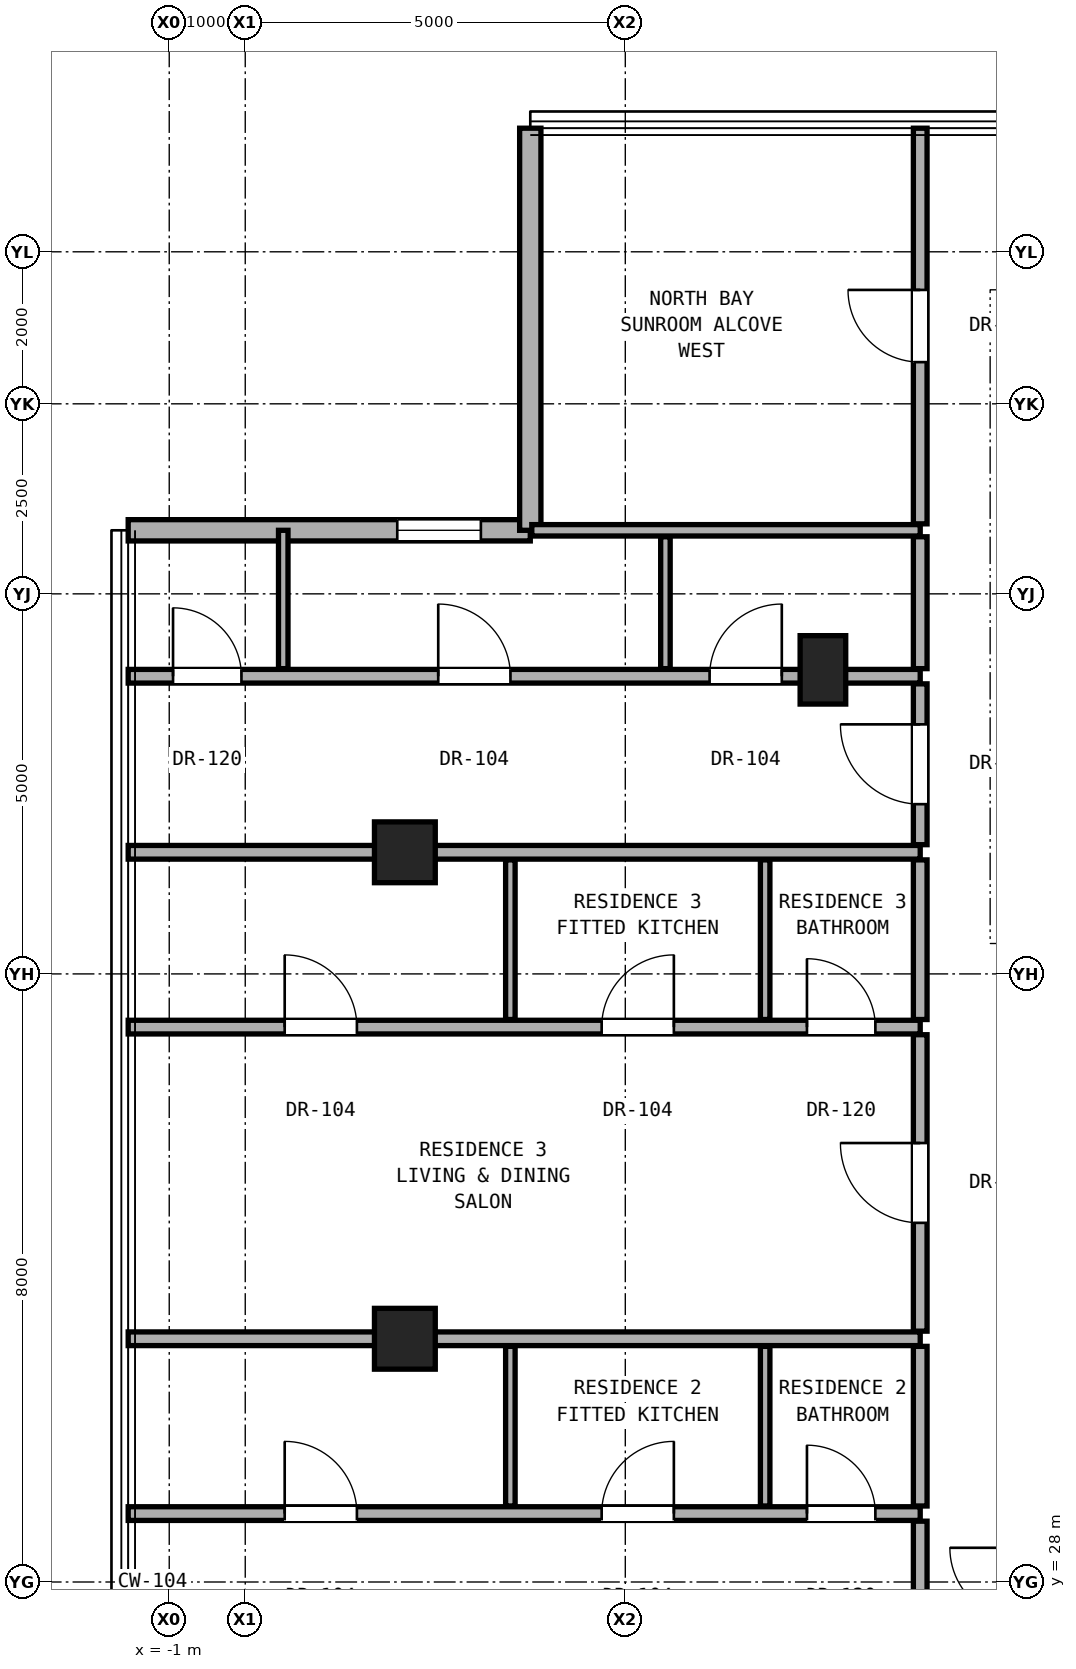
"""IFC4 building model, lengths in metres.
Left out: names, types, materials, properties, quantities, classifications, styles, units other than length and angle.
Written with IfcOpenShell. Run it as: python <this file> out.ifc"""

import sys

from ifc_helpers import new_model, si_unit, direction, frame, frame_2d, origin, origin_2d, place, context, subcontext, project, spatial, rectangle, hollow_rectangle, extrude, element, fill, save


model = new_model("IFC4")
c1 = context("Model", 3, precision=1e-05, world=origin(), true_north=direction((0.0, 1.0)))
c2 = subcontext(c1, "Body", "Model", "MODEL_VIEW")
j1 = project(units=[si_unit("LENGTHUNIT", "METRE"), si_unit("PLANEANGLEUNIT", "RADIAN")], contexts=[c1])
p1 = place(None, origin())
s1 = spatial("IfcSite", under=j1, at=p1, CompositionType="ELEMENT")
p2 = place(p1, origin())
s2 = spatial("IfcBuilding", under=s1, at=p2, CompositionType="ELEMENT")
p3 = place(p2, frame((0.0, 0.0, 242.5)))
s3 = spatial("IfcBuildingStorey", under=s2, at=p3, CompositionType="ELEMENT", Elevation=242.5)
for number, where, z_axis, x_axis in (
    (1, (2.1, 31.2, 0.0), (0.0, 0.0, 1.0), (1.0, 0.0, 0.0)),
    (2, (2.1, 37.6, 0.0), (0.0, 0.0, 1.0), (1.0, 0.0, 0.0)),
):
    element("IfcColumn", number, at=place(p3, frame(where, z_axis=z_axis, x_axis=x_axis)), inside=s3, PredefinedType="COLUMN", context=c2, shape_type="SweptSolid", body=[
        extrude(hollow_rectangle(XDim=0.8, YDim=0.8, WallThickness=0.045, at=origin_2d()), origin(), (0.0, 0.0, 1.0), 3.3),
    ])
p4 = place(p3, frame((7.6, 40.0, 0.0), z_axis=(0.0, 0.0, 1.0), x_axis=(1.0, 0.0, 0.0)))
e3 = element("IfcColumn", 3, at=p4, inside=s3, PredefinedType="PILASTER", context=c2, shape_type="SweptSolid", body=[
    extrude(rectangle(XDim=0.6, YDim=0.9, at=origin_2d()), origin(), (0.0, 0.0, 1.0), 3.3),
])
p5 = place(p3, frame((3.75, 41.836, 0.0), z_axis=(0.0, 0.0, 1.0), x_axis=(-1.0, 0.0, 0.0)))
e4 = element("IfcWall", 4, at=p5, inside=s3, PredefinedType="SOLIDWALL", context=c2, shape_type="SweptSolid", body=[
    extrude(rectangle(XDim=5.29, YDim=0.28, at=frame_2d((2.645, 0.0))), origin(), (0.0, 0.0, 1.0), 3.08),
])
p6 = place(p5, frame((0.65, 0.0, 0.85)))
e5 = element("IfcOpeningElement", 5, at=p6, cuts=e4, PredefinedType="OPENING", context=c2, shape_type="SweptSolid", body=[
    extrude(rectangle(XDim=1.1, YDim=2.0, at=frame_2d((0.55, 1.0))), frame((0.0, 0.15, 0.0), z_axis=(0.0, -1.0, 0.0), x_axis=(1.0, 0.0, 0.0)), (0.0, 0.0, 1.0), 0.3),
])
p7 = place(p3, frame((3.75, 47.126, 0.0), z_axis=(0.0, 0.0, 1.0), x_axis=(0.0, -1.0, 0.0)))
e6 = element("IfcWall", 6, at=p7, inside=s3, PredefinedType="SOLIDWALL", context=c2, shape_type="SweptSolid", body=[
    extrude(rectangle(XDim=5.29, YDim=0.28, at=frame_2d((2.645, 0.0))), origin(), (0.0, 0.0, 1.0), 3.08),
])
p8 = place(p3, frame((-1.54, 28.9, 0.0), z_axis=(0.0, 0.0, 1.0), x_axis=(1.0, 0.0, 0.0)))
e7 = element("IfcWall", 7, at=p8, inside=s3, PredefinedType="PARTITIONING", context=c2, shape_type="SweptSolid", body=[
    extrude(rectangle(XDim=10.42, YDim=0.18, at=frame_2d((5.21, 0.0))), origin(), (0.0, 0.0, 1.0), 2.319),
])
p9 = place(p8, frame((2.059, 0.0, 0.0)))
e8 = element("IfcOpeningElement", 8, at=p9, cuts=e7, PredefinedType="OPENING", context=c2, shape_type="SweptSolid", body=[
    extrude(rectangle(XDim=0.95, YDim=2.15, at=frame_2d((0.475, 1.075))), frame((0.0, 0.1, 0.0), z_axis=(0.0, -1.0, 0.0), x_axis=(1.0, 0.0, 0.0)), (0.0, 0.0, 1.0), 0.2),
])
p10 = place(p8, frame((6.229, 0.0, 0.0)))
e9 = element("IfcOpeningElement", 9, at=p10, cuts=e7, PredefinedType="OPENING", context=c2, shape_type="SweptSolid", body=[
    extrude(rectangle(XDim=0.95, YDim=2.15, at=frame_2d((0.475, 1.075))), frame((0.0, 0.1, 0.0), z_axis=(0.0, -1.0, 0.0), x_axis=(1.0, 0.0, 0.0)), (0.0, 0.0, 1.0), 0.2),
])
p11 = place(p8, frame((8.93, 0.0, 0.0)))
e10 = element("IfcOpeningElement", 10, at=p11, cuts=e7, PredefinedType="OPENING", context=c2, shape_type="SweptSolid", body=[
    extrude(rectangle(XDim=0.9, YDim=2.1, at=frame_2d((0.45, 1.05))), frame((0.0, 0.1, 0.0), z_axis=(0.0, -1.0, 0.0), x_axis=(1.0, 0.0, 0.0)), (0.0, 0.0, 1.0), 0.2),
])
p12 = place(p3, frame((-1.54, 31.2, 0.0), z_axis=(0.0, 0.0, 1.0), x_axis=(1.0, 0.0, 0.0)))
e11 = element("IfcWall", 11, at=p12, inside=s3, PredefinedType="PARTITIONING", context=c2, shape_type="SweptSolid", body=[
    extrude(rectangle(XDim=10.42, YDim=0.18, at=frame_2d((5.21, 0.0))), origin(), (0.0, 0.0, 1.0), 2.319),
])
p13 = place(p3, frame((-1.54, 35.3, 0.0), z_axis=(0.0, 0.0, 1.0), x_axis=(1.0, 0.0, 0.0)))
e12 = element("IfcWall", 12, at=p13, inside=s3, PredefinedType="PARTITIONING", context=c2, shape_type="SweptSolid", body=[
    extrude(rectangle(XDim=10.42, YDim=0.18, at=frame_2d((5.21, 0.0))), origin(), (0.0, 0.0, 1.0), 2.319),
])
p14 = place(p13, frame((2.059, 0.0, 0.0)))
e13 = element("IfcOpeningElement", 13, at=p14, cuts=e12, PredefinedType="OPENING", context=c2, shape_type="SweptSolid", body=[
    extrude(rectangle(XDim=0.95, YDim=2.15, at=frame_2d((0.475, 1.075))), frame((0.0, 0.1, 0.0), z_axis=(0.0, -1.0, 0.0), x_axis=(1.0, 0.0, 0.0)), (0.0, 0.0, 1.0), 0.2),
])
p15 = place(p13, frame((6.229, 0.0, 0.0)))
e14 = element("IfcOpeningElement", 14, at=p15, cuts=e12, PredefinedType="OPENING", context=c2, shape_type="SweptSolid", body=[
    extrude(rectangle(XDim=0.95, YDim=2.15, at=frame_2d((0.475, 1.075))), frame((0.0, 0.1, 0.0), z_axis=(0.0, -1.0, 0.0), x_axis=(1.0, 0.0, 0.0)), (0.0, 0.0, 1.0), 0.2),
])
p16 = place(p13, frame((8.93, 0.0, 0.0)))
e15 = element("IfcOpeningElement", 15, at=p16, cuts=e12, PredefinedType="OPENING", context=c2, shape_type="SweptSolid", body=[
    extrude(rectangle(XDim=0.9, YDim=2.1, at=frame_2d((0.45, 1.05))), frame((0.0, 0.1, 0.0), z_axis=(0.0, -1.0, 0.0), x_axis=(1.0, 0.0, 0.0)), (0.0, 0.0, 1.0), 0.2),
])
p17 = place(p3, frame((-1.54, 37.6, 0.0), z_axis=(0.0, 0.0, 1.0), x_axis=(1.0, 0.0, 0.0)))
e16 = element("IfcWall", 16, at=p17, inside=s3, PredefinedType="PARTITIONING", context=c2, shape_type="SweptSolid", body=[
    extrude(rectangle(XDim=10.42, YDim=0.18, at=frame_2d((5.21, 0.0))), origin(), (0.0, 0.0, 1.0), 2.319),
])
p18 = place(p3, frame((-1.54, 39.916, 0.0), z_axis=(0.0, 0.0, 1.0), x_axis=(1.0, 0.0, 0.0)))
e17 = element("IfcWall", 17, at=p18, inside=s3, PredefinedType="PARTITIONING", context=c2, shape_type="SweptSolid", body=[
    extrude(rectangle(XDim=10.42, YDim=0.18, at=frame_2d((5.21, 0.0))), origin(), (0.0, 0.0, 1.0), 2.543),
])
p19 = place(p18, frame((4.079, 0.0, 0.0)))
e18 = element("IfcOpeningElement", 18, at=p19, cuts=e17, PredefinedType="OPENING", context=c2, shape_type="SweptSolid", body=[
    extrude(rectangle(XDim=0.95, YDim=2.15, at=frame_2d((0.475, 1.075))), frame((0.0, 0.1, 0.0), z_axis=(0.0, -1.0, 0.0), x_axis=(1.0, 0.0, 0.0)), (0.0, 0.0, 1.0), 0.2),
])
p20 = place(p18, frame((7.649, 0.0, 0.0)))
e19 = element("IfcOpeningElement", 19, at=p20, cuts=e17, PredefinedType="OPENING", context=c2, shape_type="SweptSolid", body=[
    extrude(rectangle(XDim=0.95, YDim=2.15, at=frame_2d((0.475, 1.075))), frame((0.0, 0.1, 0.0), z_axis=(0.0, -1.0, 0.0), x_axis=(1.0, 0.0, 0.0)), (0.0, 0.0, 1.0), 0.2),
])
p21 = place(p18, frame((0.59, 0.0, 0.0)))
e20 = element("IfcOpeningElement", 20, at=p21, cuts=e17, PredefinedType="OPENING", context=c2, shape_type="SweptSolid", body=[
    extrude(rectangle(XDim=0.9, YDim=2.1, at=frame_2d((0.45, 1.05))), frame((0.0, 0.1, 0.0), z_axis=(0.0, -1.0, 0.0), x_axis=(1.0, 0.0, 0.0)), (0.0, 0.0, 1.0), 0.2),
])
p22 = place(p3, frame((3.77, 41.836, 0.0), z_axis=(0.0, 0.0, 1.0), x_axis=(1.0, 0.0, 0.0)))
e21 = element("IfcWall", 21, at=p22, inside=s3, PredefinedType="PARTITIONING", context=c2, shape_type="SweptSolid", body=[
    extrude(rectangle(XDim=5.11, YDim=0.15, at=frame_2d((2.555, 0.0))), origin(), (0.0, 0.0, 1.0), 3.1),
])
p23 = place(p3, frame((0.5, 40.016, 0.0), z_axis=(0.0, 0.0, 1.0), x_axis=(0.0, 1.0, 0.0)))
e22 = element("IfcWall", 22, at=p23, inside=s3, PredefinedType="PARTITIONING", context=c2, shape_type="SweptSolid", body=[
    extrude(rectangle(XDim=1.82, YDim=0.125, at=frame_2d((0.91, 0.0))), origin(), (0.0, 0.0, 1.0), 3.1),
])
p24 = place(p3, frame((3.488, 29.0, 0.0), z_axis=(0.0, 0.0, 1.0), x_axis=(0.0, 1.0, 0.0)))
e23 = element("IfcWall", 23, at=p24, inside=s3, PredefinedType="PARTITIONING", context=c2, shape_type="SweptSolid", body=[
    extrude(rectangle(XDim=2.1, YDim=0.125, at=frame_2d((1.05, 0.0))), origin(), (0.0, 0.0, 1.0), 2.396),
])
p25 = place(p3, frame((3.488, 35.4, 0.0), z_axis=(0.0, 0.0, 1.0), x_axis=(0.0, 1.0, 0.0)))
e24 = element("IfcWall", 24, at=p25, inside=s3, PredefinedType="PARTITIONING", context=c2, shape_type="SweptSolid", body=[
    extrude(rectangle(XDim=2.1, YDim=0.125, at=frame_2d((1.05, 0.0))), origin(), (0.0, 0.0, 1.0), 2.492),
])
p26 = place(p3, frame((5.528, 40.016, 0.0), z_axis=(0.0, 0.0, 1.0), x_axis=(0.0, 1.0, 0.0)))
e25 = element("IfcWall", 25, at=p26, inside=s3, PredefinedType="PARTITIONING", context=c2, shape_type="SweptSolid", body=[
    extrude(rectangle(XDim=1.735, YDim=0.125, at=frame_2d((0.867, 0.0))), origin(), (0.0, 0.0, 1.0), 3.1),
])
p27 = place(p3, frame((6.84, 29.0, 0.0), z_axis=(0.0, 0.0, 1.0), x_axis=(0.0, 1.0, 0.0)))
e26 = element("IfcWall", 26, at=p27, inside=s3, PredefinedType="PARTITIONING", context=c2, shape_type="SweptSolid", body=[
    extrude(rectangle(XDim=2.1, YDim=0.125, at=frame_2d((1.05, 0.0))), origin(), (0.0, 0.0, 1.0), 2.396),
])
p28 = place(p3, frame((6.84, 35.4, 0.0), z_axis=(0.0, 0.0, 1.0), x_axis=(0.0, 1.0, 0.0)))
e27 = element("IfcWall", 27, at=p28, inside=s3, PredefinedType="PARTITIONING", context=c2, shape_type="SweptSolid", body=[
    extrude(rectangle(XDim=2.1, YDim=0.125, at=frame_2d((1.05, 0.0))), origin(), (0.0, 0.0, 1.0), 2.492),
])
p29 = place(p3, frame((8.88, 18.5, 0.0), z_axis=(0.0, 0.0, 1.0), x_axis=(0.0, 1.0, 0.0)))
e28 = element("IfcWall", 28, at=p29, inside=s3, PredefinedType="PARTITIONING", context=c2, shape_type="SweptSolid", body=[
    extrude(rectangle(XDim=10.3, YDim=0.18, at=frame_2d((5.15, 0.0))), origin(), (0.0, 0.0, 1.0), 2.396),
])
p30 = place(p29, frame((4.625, 0.0, 0.0)))
e29 = element("IfcOpeningElement", 29, at=p30, cuts=e28, PredefinedType="OPENING", context=c2, shape_type="SweptSolid", body=[
    extrude(rectangle(XDim=1.05, YDim=2.2, at=frame_2d((0.525, 1.1))), frame((0.0, 0.1, 0.0), z_axis=(0.0, -1.0, 0.0), x_axis=(1.0, 0.0, 0.0)), (0.0, 0.0, 1.0), 0.2),
])
p31 = place(p3, frame((8.88, 29.0, 0.0), z_axis=(0.0, 0.0, 1.0), x_axis=(0.0, 1.0, 0.0)))
e30 = element("IfcWall", 30, at=p31, inside=s3, PredefinedType="PARTITIONING", context=c2, shape_type="SweptSolid", body=[
    extrude(rectangle(XDim=2.1, YDim=0.18, at=frame_2d((1.05, 0.0))), origin(), (0.0, 0.0, 1.0), 2.396),
])
p32 = place(p3, frame((8.88, 31.3, 0.0), z_axis=(0.0, 0.0, 1.0), x_axis=(0.0, 1.0, 0.0)))
e31 = element("IfcWall", 31, at=p32, inside=s3, PredefinedType="PARTITIONING", context=c2, shape_type="SweptSolid", body=[
    extrude(rectangle(XDim=3.9, YDim=0.18, at=frame_2d((1.95, 0.0))), origin(), (0.0, 0.0, 1.0), 2.396),
])
p33 = place(p32, frame((1.425, 0.0, 0.0)))
e32 = element("IfcOpeningElement", 32, at=p33, cuts=e31, PredefinedType="OPENING", context=c2, shape_type="SweptSolid", body=[
    extrude(rectangle(XDim=1.05, YDim=2.2, at=frame_2d((0.525, 1.1))), frame((0.0, 0.1, 0.0), z_axis=(0.0, -1.0, 0.0), x_axis=(1.0, 0.0, 0.0)), (0.0, 0.0, 1.0), 0.2),
])
p34 = place(p3, frame((8.88, 35.4, 0.0), z_axis=(0.0, 0.0, 1.0), x_axis=(0.0, 1.0, 0.0)))
e33 = element("IfcWall", 33, at=p34, inside=s3, PredefinedType="PARTITIONING", context=c2, shape_type="SweptSolid", body=[
    extrude(rectangle(XDim=2.1, YDim=0.18, at=frame_2d((1.05, 0.0))), origin(), (0.0, 0.0, 1.0), 2.492),
])
p35 = place(p3, frame((8.88, 37.7, 0.0), z_axis=(0.0, 0.0, 1.0), x_axis=(0.0, 1.0, 0.0)))
e34 = element("IfcWall", 34, at=p35, inside=s3, PredefinedType="PARTITIONING", context=c2, shape_type="SweptSolid", body=[
    extrude(rectangle(XDim=2.116, YDim=0.18, at=frame_2d((1.058, 0.0))), origin(), (0.0, 0.0, 1.0), 2.492),
])
p36 = place(p35, frame((0.533, 0.0, 0.0)))
e35 = element("IfcOpeningElement", 35, at=p36, cuts=e34, PredefinedType="OPENING", context=c2, shape_type="SweptSolid", body=[
    extrude(rectangle(XDim=1.05, YDim=2.2, at=frame_2d((0.525, 1.1))), frame((0.0, 0.1, 0.0), z_axis=(0.0, -1.0, 0.0), x_axis=(1.0, 0.0, 0.0)), (0.0, 0.0, 1.0), 0.2),
])
p37 = place(p3, frame((8.88, 40.016, 0.0), z_axis=(0.0, 0.0, 1.0), x_axis=(0.0, 1.0, 0.0)))
e36 = element("IfcWall", 36, at=p37, inside=s3, PredefinedType="PARTITIONING", context=c2, shape_type="SweptSolid", body=[
    extrude(rectangle(XDim=1.735, YDim=0.18, at=frame_2d((0.867, 0.0))), origin(), (0.0, 0.0, 1.0), 3.1),
])
p38 = place(p3, frame((8.88, 41.921, 0.0), z_axis=(0.0, 0.0, 1.0), x_axis=(0.0, 1.0, 0.0)))
e37 = element("IfcWall", 37, at=p38, inside=s3, PredefinedType="PARTITIONING", context=c2, shape_type="SweptSolid", body=[
    extrude(rectangle(XDim=5.205, YDim=0.18, at=frame_2d((2.603, 0.0))), origin(), (0.0, 0.0, 1.0), 3.1),
])
p39 = place(p38, frame((2.127, 0.0, 0.0)))
e38 = element("IfcOpeningElement", 38, at=p39, cuts=e37, PredefinedType="OPENING", context=c2, shape_type="SweptSolid", body=[
    extrude(rectangle(XDim=0.95, YDim=2.15, at=frame_2d((0.475, 1.075))), frame((0.0, 0.1, 0.0), z_axis=(0.0, -1.0, 0.0), x_axis=(1.0, 0.0, 0.0)), (0.0, 0.0, 1.0), 0.2),
])
p40 = place(p6, origin())
e39 = element("IfcWindow", 39, at=p40, inside=s3, PartitioningType="SINGLE_PANEL", PredefinedType="WINDOW", context=c2, shape_type="SweptSolid", body=[
    extrude(rectangle(XDim=1.1, YDim=2.0, at=frame_2d((0.55, 1.0))), frame((0.0, 0.03, 0.0), z_axis=(0.0, -1.0, 0.0), x_axis=(1.0, 0.0, 0.0)), (0.0, 0.0, 1.0), 0.06),
])
fill(e5, e39)
p41 = place(p9, origin())
e40 = element("IfcDoor", 40, at=p41, inside=s3, OperationType="SINGLE_SWING_LEFT", PredefinedType="DOOR", context=c2, shape_type="SweptSolid", body=[
    extrude(rectangle(XDim=0.95, YDim=2.15, at=frame_2d((0.475, 1.075))), frame((0.0, 0.025, 0.0), z_axis=(0.0, -1.0, 0.0), x_axis=(1.0, 0.0, 0.0)), (0.0, 0.0, 1.0), 0.05),
])
fill(e8, e40)
p42 = place(p10, origin())
e41 = element("IfcDoor", 41, at=p42, inside=s3, OperationType="SINGLE_SWING_RIGHT", PredefinedType="DOOR", context=c2, shape_type="SweptSolid", body=[
    extrude(rectangle(XDim=0.95, YDim=2.15, at=frame_2d((0.475, 1.075))), frame((0.0, 0.025, 0.0), z_axis=(0.0, -1.0, 0.0), x_axis=(1.0, 0.0, 0.0)), (0.0, 0.0, 1.0), 0.05),
])
fill(e9, e41)
p43 = place(p11, origin())
e42 = element("IfcDoor", 42, at=p43, inside=s3, OperationType="SINGLE_SWING_LEFT", PredefinedType="DOOR", context=c2, shape_type="SweptSolid", body=[
    extrude(rectangle(XDim=0.9, YDim=2.1, at=frame_2d((0.45, 1.05))), frame((0.0, 0.025, 0.0), z_axis=(0.0, -1.0, 0.0), x_axis=(1.0, 0.0, 0.0)), (0.0, 0.0, 1.0), 0.05),
])
fill(e10, e42)
p44 = place(p33, origin())
e43 = element("IfcDoor", 43, at=p44, inside=s3, OperationType="SINGLE_SWING_RIGHT", PredefinedType="DOOR", context=c2, shape_type="SweptSolid", body=[
    extrude(rectangle(XDim=1.05, YDim=2.2, at=frame_2d((0.525, 1.1))), frame((0.0, 0.025, 0.0), z_axis=(0.0, -1.0, 0.0), x_axis=(1.0, 0.0, 0.0)), (0.0, 0.0, 1.0), 0.05),
])
fill(e32, e43)
p45 = place(p14, origin())
e44 = element("IfcDoor", 44, at=p45, inside=s3, OperationType="SINGLE_SWING_LEFT", PredefinedType="DOOR", context=c2, shape_type="SweptSolid", body=[
    extrude(rectangle(XDim=0.95, YDim=2.15, at=frame_2d((0.475, 1.075))), frame((0.0, 0.025, 0.0), z_axis=(0.0, -1.0, 0.0), x_axis=(1.0, 0.0, 0.0)), (0.0, 0.0, 1.0), 0.05),
])
fill(e13, e44)
p46 = place(p15, origin())
e45 = element("IfcDoor", 45, at=p46, inside=s3, OperationType="SINGLE_SWING_RIGHT", PredefinedType="DOOR", context=c2, shape_type="SweptSolid", body=[
    extrude(rectangle(XDim=0.95, YDim=2.15, at=frame_2d((0.475, 1.075))), frame((0.0, 0.025, 0.0), z_axis=(0.0, -1.0, 0.0), x_axis=(1.0, 0.0, 0.0)), (0.0, 0.0, 1.0), 0.05),
])
fill(e14, e45)
p47 = place(p16, origin())
e46 = element("IfcDoor", 46, at=p47, inside=s3, OperationType="SINGLE_SWING_LEFT", PredefinedType="DOOR", context=c2, shape_type="SweptSolid", body=[
    extrude(rectangle(XDim=0.9, YDim=2.1, at=frame_2d((0.45, 1.05))), frame((0.0, 0.025, 0.0), z_axis=(0.0, -1.0, 0.0), x_axis=(1.0, 0.0, 0.0)), (0.0, 0.0, 1.0), 0.05),
])
fill(e15, e46)
p48 = place(p36, origin())
e47 = element("IfcDoor", 47, at=p48, inside=s3, OperationType="SINGLE_SWING_RIGHT", PredefinedType="DOOR", context=c2, shape_type="SweptSolid", body=[
    extrude(rectangle(XDim=1.05, YDim=2.2, at=frame_2d((0.525, 1.1))), frame((0.0, 0.025, 0.0), z_axis=(0.0, -1.0, 0.0), x_axis=(1.0, 0.0, 0.0)), (0.0, 0.0, 1.0), 0.05),
])
fill(e35, e47)
p49 = place(p19, origin())
e48 = element("IfcDoor", 48, at=p49, inside=s3, OperationType="SINGLE_SWING_LEFT", PredefinedType="DOOR", context=c2, shape_type="SweptSolid", body=[
    extrude(rectangle(XDim=0.95, YDim=2.15, at=frame_2d((0.475, 1.075))), frame((0.0, 0.025, 0.0), z_axis=(0.0, -1.0, 0.0), x_axis=(1.0, 0.0, 0.0)), (0.0, 0.0, 1.0), 0.05),
])
fill(e18, e48)
p50 = place(p20, origin())
e49 = element("IfcDoor", 49, at=p50, inside=s3, OperationType="SINGLE_SWING_RIGHT", PredefinedType="DOOR", context=c2, shape_type="SweptSolid", body=[
    extrude(rectangle(XDim=0.95, YDim=2.15, at=frame_2d((0.475, 1.075))), frame((0.0, 0.025, 0.0), z_axis=(0.0, -1.0, 0.0), x_axis=(1.0, 0.0, 0.0)), (0.0, 0.0, 1.0), 0.05),
])
fill(e19, e49)
p51 = place(p21, origin())
e50 = element("IfcDoor", 50, at=p51, inside=s3, OperationType="SINGLE_SWING_LEFT", PredefinedType="DOOR", context=c2, shape_type="SweptSolid", body=[
    extrude(rectangle(XDim=0.9, YDim=2.1, at=frame_2d((0.45, 1.05))), frame((0.0, 0.025, 0.0), z_axis=(0.0, -1.0, 0.0), x_axis=(1.0, 0.0, 0.0)), (0.0, 0.0, 1.0), 0.05),
])
fill(e20, e50)
p52 = place(p39, origin())
e51 = element("IfcDoor", 51, at=p52, inside=s3, OperationType="SINGLE_SWING_RIGHT", PredefinedType="DOOR", context=c2, shape_type="SweptSolid", body=[
    extrude(rectangle(XDim=0.95, YDim=2.15, at=frame_2d((0.475, 1.075))), frame((0.0, 0.025, 0.0), z_axis=(0.0, -1.0, 0.0), x_axis=(1.0, 0.0, 0.0)), (0.0, 0.0, 1.0), 0.05),
])
fill(e38, e51)
save(model, sys.argv[1])
